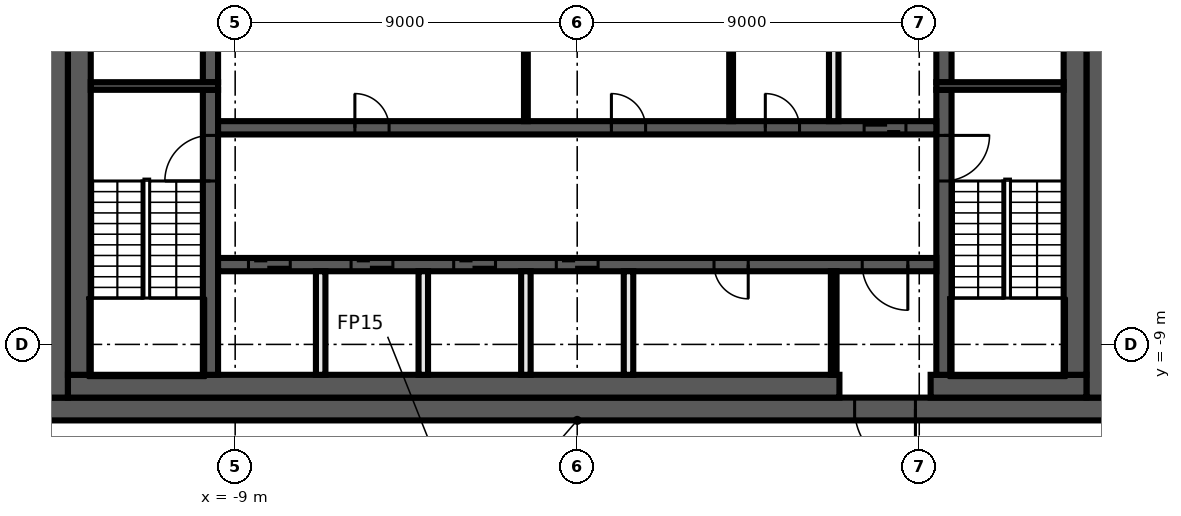
"""IFC4 building model, lengths in metres.
Left out: names, types, materials, properties, quantities, classifications, styles, units other than length and angle.
Written with IfcOpenShell. Run it as: python <this file> out.ifc"""

import sys

from ifc_helpers import new_model, si_unit, direction, frame, frame_2d, origin, place, context, subcontext, project, spatial, rectangle, extrude, element, fill, save


model = new_model("IFC4")
c1 = context("Model", 3, precision=1e-05, world=origin(), true_north=direction((0.0, 1.0)))
c2 = subcontext(c1, "Body", "Model", "MODEL_VIEW")
j1 = project(units=[si_unit("LENGTHUNIT", "METRE"), si_unit("PLANEANGLEUNIT", "RADIAN")], contexts=[c1])
p1 = place(None, origin())
s1 = spatial("IfcSite", under=j1, at=p1, CompositionType="ELEMENT")
p2 = place(p1, origin())
s2 = spatial("IfcBuilding", under=s1, at=p2, CompositionType="ELEMENT")
p3 = place(p2, frame((0.0, 0.0, 311.0)))
s3 = spatial("IfcBuildingStorey", under=s2, at=p3, CompositionType="ELEMENT", Elevation=311.0)
p4 = place(p3, frame((14.0, -10.7, 0.0), z_axis=(0.0, 0.0, 1.0), x_axis=(-1.0, 0.0, 0.0)))
e1 = element("IfcWall", 1, at=p4, inside=s3, PredefinedType="SHEAR", context=c2, shape_type="SweptSolid", body=[
    extrude(rectangle(XDim=28.0, YDim=0.6, at=frame_2d((14.0, 0.0))), origin(), (0.0, 0.0, 1.0), 3.82),
])
p5 = place(p4, frame((5.1, 0.0, 0.0)))
e2 = element("IfcOpeningElement", 2, at=p5, cuts=e1, PredefinedType="OPENING", context=c2, shape_type="SweptSolid", body=[
    extrude(rectangle(XDim=1.6, YDim=2.1, at=frame_2d((0.8, 1.05))), frame((0.0, 0.31, 0.0), z_axis=(0.0, -1.0, 0.0), x_axis=(1.0, 0.0, 0.0)), (0.0, 0.0, 1.0), 0.62),
])
for number, where, z_axis, x_axis in (
    (3, (13.7, 10.4, 0.0), (0.0, 0.0, 1.0), (0.0, -1.0, 0.0)),
    (4, (-13.7, -10.4, 0.0), (0.0, 0.0, 1.0), (0.0, 1.0, 0.0)),
):
    element("IfcWall", number, at=place(p3, frame(where, z_axis=z_axis, x_axis=x_axis)), inside=s3, PredefinedType="SHEAR", context=c2, shape_type="SweptSolid", body=[
        extrude(rectangle(XDim=20.8, YDim=0.6, at=frame_2d((10.4, 0.0))), origin(), (0.0, 0.0, 1.0), 3.82),
    ])
p6 = place(p3, frame((13.4, -10.1, 0.0), z_axis=(0.0, 0.0, 1.0), x_axis=(-1.0, 0.0, 0.0)))
e5 = element("IfcWall", 5, at=p6, inside=s3, PredefinedType="SHEAR", context=c2, shape_type="SweptSolid", body=[
    extrude(rectangle(XDim=4.1, YDim=0.6, at=frame_2d((2.05, 0.0))), origin(), (0.0, 0.0, 1.0), 3.82),
])
p7 = place(p3, frame((6.9, -10.1, 0.0), z_axis=(0.0, 0.0, 1.0), x_axis=(-1.0, 0.0, 0.0)))
e6 = element("IfcWall", 6, at=p7, inside=s3, PredefinedType="SHEAR", context=c2, shape_type="SweptSolid", body=[
    extrude(rectangle(XDim=20.3, YDim=0.6, at=frame_2d((10.15, 0.0))), origin(), (0.0, 0.0, 1.0), 3.82),
])
for number, where, z_axis, x_axis in (
    (7, (13.1, 9.8, 0.0), (0.0, 0.0, 1.0), (0.0, -1.0, 0.0)),
    (8, (-13.1, -9.8, 0.0), (0.0, 0.0, 1.0), (0.0, 1.0, 0.0)),
):
    element("IfcWall", number, at=place(p3, frame(where, z_axis=z_axis, x_axis=x_axis)), inside=s3, PredefinedType="SHEAR", context=c2, shape_type="SweptSolid", body=[
        extrude(rectangle(XDim=19.6, YDim=0.6, at=frame_2d((9.8, 0.0))), origin(), (0.0, 0.0, 1.0), 3.82),
    ])
p8 = place(p3, frame((9.65, -2.3, 0.0), z_axis=(0.0, 0.0, 1.0), x_axis=(0.0, -1.0, 0.0)))
e9 = element("IfcWall", 9, at=p8, inside=s3, PredefinedType="SHEAR", context=c2, shape_type="SweptSolid", body=[
    extrude(rectangle(XDim=7.5, YDim=0.4, at=frame_2d((3.75, 0.0))), origin(), (0.0, 0.0, 1.0), 3.82),
])
p9 = place(p8, frame((1.2, 0.0, 0.0)))
e10 = element("IfcOpeningElement", 10, at=p9, cuts=e9, PredefinedType="OPENING", context=c2, shape_type="SweptSolid", body=[
    extrude(rectangle(XDim=1.2, YDim=2.1, at=frame_2d((0.6, 1.05))), frame((0.0, 0.21, 0.0), z_axis=(0.0, -1.0, 0.0), x_axis=(1.0, 0.0, 0.0)), (0.0, 0.0, 1.0), 0.42),
])
p10 = place(p3, frame((9.65, 2.1, 0.0), z_axis=(0.0, 0.0, 1.0), x_axis=(0.0, -1.0, 0.0)))
e11 = element("IfcWall", 11, at=p10, inside=s3, PredefinedType="SHEAR", context=c2, shape_type="SweptSolid", body=[
    extrude(rectangle(XDim=4.2, YDim=0.4, at=frame_2d((2.1, 0.0))), origin(), (0.0, 0.0, 1.0), 3.82),
])
p11 = place(p10, frame((0.15, 0.0, 0.0)))
e12 = element("IfcOpeningElement", 12, at=p11, cuts=e11, PredefinedType="OPENING", context=c2, shape_type="SweptSolid", body=[
    extrude(rectangle(XDim=0.9, YDim=2.1, at=frame_2d((0.45, 1.05))), frame((0.0, 0.21, 0.0), z_axis=(0.0, -1.0, 0.0), x_axis=(1.0, 0.0, 0.0)), (0.0, 0.0, 1.0), 0.42),
])
p12 = place(p3, frame((-9.65, -9.8, 0.0), z_axis=(0.0, 0.0, 1.0), x_axis=(0.0, 1.0, 0.0)))
e13 = element("IfcWall", 13, at=p12, inside=s3, PredefinedType="SHEAR", context=c2, shape_type="SweptSolid", body=[
    extrude(rectangle(XDim=7.5, YDim=0.4, at=frame_2d((3.75, 0.0))), origin(), (0.0, 0.0, 1.0), 3.82),
])
p13 = place(p12, frame((5.1, 0.0, 0.0)))
e14 = element("IfcOpeningElement", 14, at=p13, cuts=e13, PredefinedType="OPENING", context=c2, shape_type="SweptSolid", body=[
    extrude(rectangle(XDim=1.2, YDim=2.1, at=frame_2d((0.6, 1.05))), frame((0.0, 0.21, 0.0), z_axis=(0.0, -1.0, 0.0), x_axis=(1.0, 0.0, 0.0)), (0.0, 0.0, 1.0), 0.42),
])
p14 = place(p3, frame((-9.65, -2.1, 0.0), z_axis=(0.0, 0.0, 1.0), x_axis=(0.0, 1.0, 0.0)))
e15 = element("IfcWall", 15, at=p14, inside=s3, PredefinedType="SHEAR", context=c2, shape_type="SweptSolid", body=[
    extrude(rectangle(XDim=4.2, YDim=0.4, at=frame_2d((2.1, 0.0))), origin(), (0.0, 0.0, 1.0), 3.82),
])
for number, where, z_axis, x_axis in (
    (16, (9.45, -2.2, 0.0), (0.0, 0.0, 1.0), (1.0, 0.0, 0.0)),
    (17, (-9.45, -2.2, 0.0), (0.0, 0.0, 1.0), (-1.0, 0.0, 0.0)),
):
    element("IfcWall", number, at=place(p3, frame(where, z_axis=z_axis, x_axis=x_axis)), inside=s3, PredefinedType="SHEAR", context=c2, shape_type="SweptSolid", body=[
        extrude(rectangle(XDim=3.35, YDim=0.2, at=frame_2d((1.675, 0.0))), origin(), (0.0, 0.0, 1.0), 3.82),
    ])
p15 = place(p3, frame((-9.45, -3.3, 0.0), z_axis=(0.0, 0.0, 1.0), x_axis=(1.0, 0.0, 0.0)))
e18 = element("IfcWall", 18, at=p15, inside=s3, PredefinedType="SHEAR", context=c2, shape_type="SweptSolid", body=[
    extrude(rectangle(XDim=18.9, YDim=0.35, at=frame_2d((9.45, 0.0))), origin(), (0.0, 0.0, 1.0), 3.82),
])
p16 = place(p15, frame((17.0, 0.0, 0.0)))
e19 = element("IfcOpeningElement", 19, at=p16, cuts=e18, PredefinedType="OPENING", context=c2, shape_type="SweptSolid", body=[
    extrude(rectangle(XDim=1.1, YDim=2.1, at=frame_2d((0.55, 1.05))), frame((0.0, 0.185, 0.0), z_axis=(0.0, -1.0, 0.0), x_axis=(1.0, 0.0, 0.0)), (0.0, 0.0, 1.0), 0.37),
])
p17 = place(p15, frame((3.6, 0.0, 0.0)))
e20 = element("IfcOpeningElement", 20, at=p17, cuts=e18, PredefinedType="OPENING", context=c2, shape_type="SweptSolid", body=[
    extrude(rectangle(XDim=0.9, YDim=2.1, at=frame_2d((0.45, 1.05))), frame((0.0, 0.185, 0.0), z_axis=(0.0, -1.0, 0.0), x_axis=(1.0, 0.0, 0.0)), (0.0, 0.0, 1.0), 0.37),
])
p18 = place(p15, frame((10.35, 0.0, 0.0)))
e21 = element("IfcOpeningElement", 21, at=p18, cuts=e18, PredefinedType="OPENING", context=c2, shape_type="SweptSolid", body=[
    extrude(rectangle(XDim=0.9, YDim=2.1, at=frame_2d((0.45, 1.05))), frame((0.0, 0.185, 0.0), z_axis=(0.0, -1.0, 0.0), x_axis=(1.0, 0.0, 0.0)), (0.0, 0.0, 1.0), 0.37),
])
p19 = place(p15, frame((14.4, 0.0, 0.0)))
e22 = element("IfcOpeningElement", 22, at=p19, cuts=e18, PredefinedType="OPENING", context=c2, shape_type="SweptSolid", body=[
    extrude(rectangle(XDim=0.9, YDim=2.1, at=frame_2d((0.45, 1.05))), frame((0.0, 0.185, 0.0), z_axis=(0.0, -1.0, 0.0), x_axis=(1.0, 0.0, 0.0)), (0.0, 0.0, 1.0), 0.37),
])
p20 = place(p3, frame((9.45, -6.9, 0.0), z_axis=(0.0, 0.0, 1.0), x_axis=(-1.0, 0.0, 0.0)))
e23 = element("IfcWall", 23, at=p20, inside=s3, PredefinedType="SHEAR", context=c2, shape_type="SweptSolid", body=[
    extrude(rectangle(XDim=18.9, YDim=0.35, at=frame_2d((9.45, 0.0))), origin(), (0.0, 0.0, 1.0), 3.82),
])
p21 = place(p20, frame((17.0, 0.0, 0.0)))
e24 = element("IfcOpeningElement", 24, at=p21, cuts=e23, PredefinedType="OPENING", context=c2, shape_type="SweptSolid", body=[
    extrude(rectangle(XDim=1.1, YDim=2.1, at=frame_2d((0.55, 1.05))), frame((0.0, 0.185, 0.0), z_axis=(0.0, -1.0, 0.0), x_axis=(1.0, 0.0, 0.0)), (0.0, 0.0, 1.0), 0.37),
])
p22 = place(p20, frame((14.3, 0.0, 0.0)))
e25 = element("IfcOpeningElement", 25, at=p22, cuts=e23, PredefinedType="OPENING", context=c2, shape_type="SweptSolid", body=[
    extrude(rectangle(XDim=1.1, YDim=2.1, at=frame_2d((0.55, 1.05))), frame((0.0, 0.185, 0.0), z_axis=(0.0, -1.0, 0.0), x_axis=(1.0, 0.0, 0.0)), (0.0, 0.0, 1.0), 0.37),
])
p23 = place(p20, frame((11.6, 0.0, 0.0)))
e26 = element("IfcOpeningElement", 26, at=p23, cuts=e23, PredefinedType="OPENING", context=c2, shape_type="SweptSolid", body=[
    extrude(rectangle(XDim=1.1, YDim=2.1, at=frame_2d((0.55, 1.05))), frame((0.0, 0.185, 0.0), z_axis=(0.0, -1.0, 0.0), x_axis=(1.0, 0.0, 0.0)), (0.0, 0.0, 1.0), 0.37),
])
p24 = place(p20, frame((8.9, 0.0, 0.0)))
e27 = element("IfcOpeningElement", 27, at=p24, cuts=e23, PredefinedType="OPENING", context=c2, shape_type="SweptSolid", body=[
    extrude(rectangle(XDim=1.1, YDim=2.1, at=frame_2d((0.55, 1.05))), frame((0.0, 0.185, 0.0), z_axis=(0.0, -1.0, 0.0), x_axis=(1.0, 0.0, 0.0)), (0.0, 0.0, 1.0), 0.37),
])
p25 = place(p20, frame((0.75, 0.0, 0.0)))
e28 = element("IfcOpeningElement", 28, at=p25, cuts=e23, PredefinedType="OPENING", context=c2, shape_type="SweptSolid", body=[
    extrude(rectangle(XDim=1.2, YDim=2.1, at=frame_2d((0.6, 1.05))), frame((0.0, 0.185, 0.0), z_axis=(0.0, -1.0, 0.0), x_axis=(1.0, 0.0, 0.0)), (0.0, 0.0, 1.0), 0.37),
])
p26 = place(p20, frame((4.95, 0.0, 0.0)))
e29 = element("IfcOpeningElement", 29, at=p26, cuts=e23, PredefinedType="OPENING", context=c2, shape_type="SweptSolid", body=[
    extrude(rectangle(XDim=0.9, YDim=2.1, at=frame_2d((0.45, 1.05))), frame((0.0, 0.185, 0.0), z_axis=(0.0, -1.0, 0.0), x_axis=(1.0, 0.0, 0.0)), (0.0, 0.0, 1.0), 0.37),
])
p27 = place(p3, frame((6.75, -9.8, 0.0), z_axis=(0.0, 0.0, 1.0), x_axis=(0.0, 1.0, 0.0)))
e30 = element("IfcWall", 30, at=p27, inside=s3, PredefinedType="PARTITIONING", context=c2, shape_type="SweptSolid", body=[
    extrude(rectangle(XDim=2.725, YDim=0.15, at=frame_2d((1.363, 0.0))), origin(), (0.0, 0.0, 1.0), 3.82),
])
p28 = place(p3, frame((6.75, -3.125, 0.0), z_axis=(0.0, 0.0, 1.0), x_axis=(0.0, 1.0, 0.0)))
e31 = element("IfcWall", 31, at=p28, inside=s3, PredefinedType="SOLIDWALL", context=c2, shape_type="SweptSolid", body=[
    extrude(rectangle(XDim=2.725, YDim=0.25, at=frame_2d((1.363, 0.0))), origin(), (0.0, 0.0, 1.0), 3.82),
])
p29 = place(p3, frame((4.05, -3.125, 0.0), z_axis=(0.0, 0.0, 1.0), x_axis=(0.0, 1.0, 0.0)))
e32 = element("IfcWall", 32, at=p29, inside=s3, PredefinedType="PARTITIONING", context=c2, shape_type="SweptSolid", body=[
    extrude(rectangle(XDim=2.725, YDim=0.1, at=frame_2d((1.363, 0.0))), origin(), (0.0, 0.0, 1.0), 3.82),
])
p30 = place(p3, frame((1.35, -9.8, 0.0), z_axis=(0.0, 0.0, 1.0), x_axis=(0.0, 1.0, 0.0)))
e33 = element("IfcWall", 33, at=p30, inside=s3, PredefinedType="SOLIDWALL", context=c2, shape_type="SweptSolid", body=[
    extrude(rectangle(XDim=2.725, YDim=0.25, at=frame_2d((1.363, 0.0))), origin(), (0.0, 0.0, 1.0), 3.82),
])
p31 = place(p3, frame((-1.35, -3.125, 0.0), z_axis=(0.0, 0.0, 1.0), x_axis=(0.0, 1.0, 0.0)))
e34 = element("IfcWall", 34, at=p31, inside=s3, PredefinedType="PARTITIONING", context=c2, shape_type="SweptSolid", body=[
    extrude(rectangle(XDim=2.725, YDim=0.1, at=frame_2d((1.363, 0.0))), origin(), (0.0, 0.0, 1.0), 3.82),
])
for number, where, z_axis, x_axis in (
    (35, (-1.35, -9.8, 0.0), (0.0, 0.0, 1.0), (0.0, 1.0, 0.0)),
    (36, (-4.05, -9.8, 0.0), (0.0, 0.0, 1.0), (0.0, 1.0, 0.0)),
    (37, (-6.75, -9.8, 0.0), (0.0, 0.0, 1.0), (0.0, 1.0, 0.0)),
):
    element("IfcWall", number, at=place(p3, frame(where, z_axis=z_axis, x_axis=x_axis)), inside=s3, PredefinedType="SOLIDWALL", context=c2, shape_type="SweptSolid", body=[
        extrude(rectangle(XDim=2.725, YDim=0.25, at=frame_2d((1.363, 0.0))), origin(), (0.0, 0.0, 1.0), 3.82),
    ])
p32 = place(p16, origin())
e38 = element("IfcDoor", 38, at=p32, inside=s3, OperationType="DOUBLE_DOOR_SLIDING", PredefinedType="DOOR", context=c2, shape_type="SweptSolid", body=[
    extrude(rectangle(XDim=1.1, YDim=2.1, at=frame_2d((0.55, 1.05))), frame((0.0, 0.025, 0.0), z_axis=(0.0, -1.0, 0.0), x_axis=(1.0, 0.0, 0.0)), (0.0, 0.0, 1.0), 0.05),
])
fill(e19, e38)
p33 = place(p21, origin())
e39 = element("IfcDoor", 39, at=p33, inside=s3, OperationType="DOUBLE_DOOR_SLIDING", PredefinedType="DOOR", context=c2, shape_type="SweptSolid", body=[
    extrude(rectangle(XDim=1.1, YDim=2.1, at=frame_2d((0.55, 1.05))), frame((0.0, 0.025, 0.0), z_axis=(0.0, -1.0, 0.0), x_axis=(1.0, 0.0, 0.0)), (0.0, 0.0, 1.0), 0.05),
])
fill(e24, e39)
p34 = place(p22, origin())
e40 = element("IfcDoor", 40, at=p34, inside=s3, OperationType="DOUBLE_DOOR_SLIDING", PredefinedType="DOOR", context=c2, shape_type="SweptSolid", body=[
    extrude(rectangle(XDim=1.1, YDim=2.1, at=frame_2d((0.55, 1.05))), frame((0.0, 0.025, 0.0), z_axis=(0.0, -1.0, 0.0), x_axis=(1.0, 0.0, 0.0)), (0.0, 0.0, 1.0), 0.05),
])
fill(e25, e40)
p35 = place(p23, origin())
e41 = element("IfcDoor", 41, at=p35, inside=s3, OperationType="DOUBLE_DOOR_SLIDING", PredefinedType="DOOR", context=c2, shape_type="SweptSolid", body=[
    extrude(rectangle(XDim=1.1, YDim=2.1, at=frame_2d((0.55, 1.05))), frame((0.0, 0.025, 0.0), z_axis=(0.0, -1.0, 0.0), x_axis=(1.0, 0.0, 0.0)), (0.0, 0.0, 1.0), 0.05),
])
fill(e26, e41)
p36 = place(p24, origin())
e42 = element("IfcDoor", 42, at=p36, inside=s3, OperationType="DOUBLE_DOOR_SLIDING", PredefinedType="DOOR", context=c2, shape_type="SweptSolid", body=[
    extrude(rectangle(XDim=1.1, YDim=2.1, at=frame_2d((0.55, 1.05))), frame((0.0, 0.025, 0.0), z_axis=(0.0, -1.0, 0.0), x_axis=(1.0, 0.0, 0.0)), (0.0, 0.0, 1.0), 0.05),
])
fill(e27, e42)
p37 = place(p5, origin())
e43 = element("IfcDoor", 43, at=p37, inside=s3, OperationType="DOUBLE_DOOR_SINGLE_SWING", PredefinedType="DOOR", context=c2, shape_type="SweptSolid", body=[
    extrude(rectangle(XDim=1.6, YDim=2.1, at=frame_2d((0.8, 1.05))), frame((0.0, 0.025, 0.0), z_axis=(0.0, -1.0, 0.0), x_axis=(1.0, 0.0, 0.0)), (0.0, 0.0, 1.0), 0.05),
])
fill(e2, e43)
p38 = place(p25, origin())
e44 = element("IfcDoor", 44, at=p38, inside=s3, OperationType="SINGLE_SWING_LEFT", PredefinedType="DOOR", context=c2, shape_type="SweptSolid", body=[
    extrude(rectangle(XDim=1.2, YDim=2.1, at=frame_2d((0.6, 1.05))), frame((0.0, 0.025, 0.0), z_axis=(0.0, -1.0, 0.0), x_axis=(1.0, 0.0, 0.0)), (0.0, 0.0, 1.0), 0.05),
])
fill(e28, e44)
p39 = place(p17, origin())
e45 = element("IfcDoor", 45, at=p39, inside=s3, OperationType="SINGLE_SWING_RIGHT", PredefinedType="DOOR", context=c2, shape_type="SweptSolid", body=[
    extrude(rectangle(XDim=0.9, YDim=2.1, at=frame_2d((0.45, 1.05))), frame((0.0, 0.025, 0.0), z_axis=(0.0, -1.0, 0.0), x_axis=(1.0, 0.0, 0.0)), (0.0, 0.0, 1.0), 0.05),
])
fill(e20, e45)
p40 = place(p18, origin())
e46 = element("IfcDoor", 46, at=p40, inside=s3, OperationType="SINGLE_SWING_LEFT", PredefinedType="DOOR", context=c2, shape_type="SweptSolid", body=[
    extrude(rectangle(XDim=0.9, YDim=2.1, at=frame_2d((0.45, 1.05))), frame((0.0, 0.025, 0.0), z_axis=(0.0, -1.0, 0.0), x_axis=(1.0, 0.0, 0.0)), (0.0, 0.0, 1.0), 0.05),
])
fill(e21, e46)
p41 = place(p19, origin())
e47 = element("IfcDoor", 47, at=p41, inside=s3, OperationType="SINGLE_SWING_RIGHT", PredefinedType="DOOR", context=c2, shape_type="SweptSolid", body=[
    extrude(rectangle(XDim=0.9, YDim=2.1, at=frame_2d((0.45, 1.05))), frame((0.0, 0.025, 0.0), z_axis=(0.0, -1.0, 0.0), x_axis=(1.0, 0.0, 0.0)), (0.0, 0.0, 1.0), 0.05),
])
fill(e22, e47)
p42 = place(p26, origin())
e48 = element("IfcDoor", 48, at=p42, inside=s3, OperationType="SINGLE_SWING_LEFT", PredefinedType="DOOR", context=c2, shape_type="SweptSolid", body=[
    extrude(rectangle(XDim=0.9, YDim=2.1, at=frame_2d((0.45, 1.05))), frame((0.0, 0.025, 0.0), z_axis=(0.0, -1.0, 0.0), x_axis=(1.0, 0.0, 0.0)), (0.0, 0.0, 1.0), 0.05),
])
fill(e29, e48)
p43 = place(p9, origin())
e49 = element("IfcDoor", 49, at=p43, inside=s3, OperationType="SINGLE_SWING_RIGHT", PredefinedType="DOOR", context=c2, shape_type="SweptSolid", body=[
    extrude(rectangle(XDim=1.2, YDim=2.1, at=frame_2d((0.6, 1.05))), frame((0.0, 0.025, 0.0), z_axis=(0.0, -1.0, 0.0), x_axis=(1.0, 0.0, 0.0)), (0.0, 0.0, 1.0), 0.05),
])
fill(e10, e49)
p44 = place(p13, origin())
e50 = element("IfcDoor", 50, at=p44, inside=s3, OperationType="SINGLE_SWING_LEFT", PredefinedType="DOOR", context=c2, shape_type="SweptSolid", body=[
    extrude(rectangle(XDim=1.2, YDim=2.1, at=frame_2d((0.6, 1.05))), frame((0.0, 0.025, 0.0), z_axis=(0.0, -1.0, 0.0), x_axis=(1.0, 0.0, 0.0)), (0.0, 0.0, 1.0), 0.05),
])
fill(e14, e50)
save(model, sys.argv[1])
